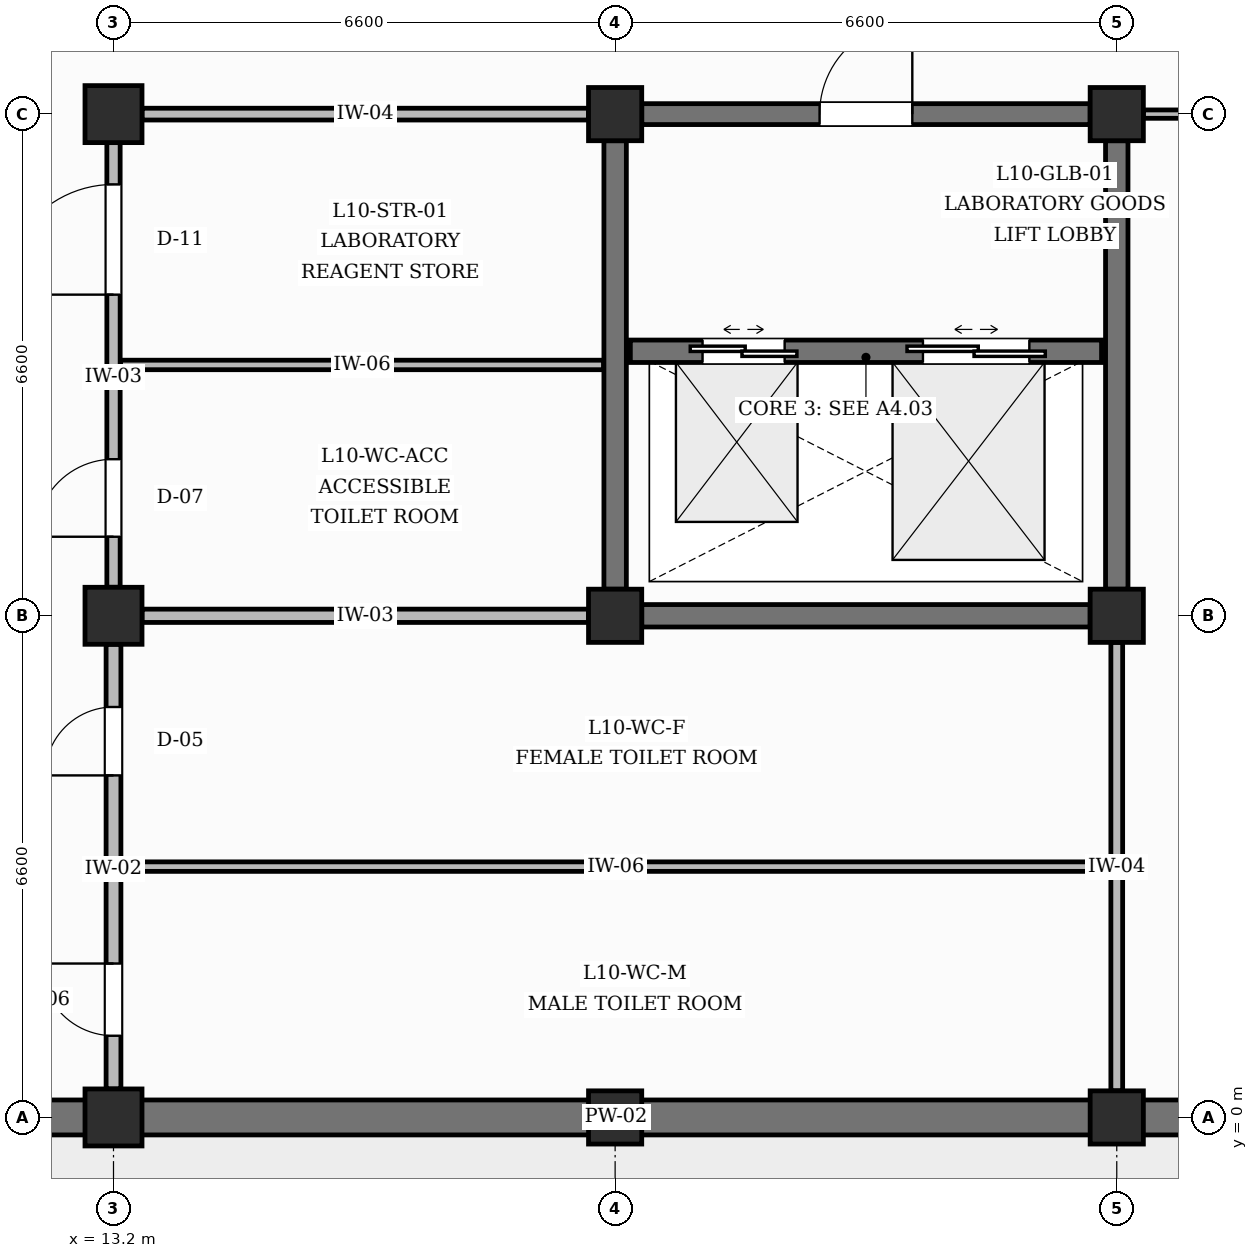
"""IFC4 building model, lengths in metres.
Left out: names, types, materials, properties, quantities, classifications, styles, units other than length and angle.
Written with IfcOpenShell. Run it as: python <this file> out.ifc"""

import sys

from ifc_helpers import new_model, si_unit, direction, frame, frame_2d, origin, origin_2d, place, context, subcontext, project, spatial, rectangle, extrude, element, fill, save


model = new_model("IFC4")
c1 = context("Model", 3, precision=1e-05, world=origin(), true_north=direction((0.0, 1.0)))
c2 = subcontext(c1, "Body", "Model", "MODEL_VIEW")
j1 = project(units=[si_unit("LENGTHUNIT", "METRE"), si_unit("PLANEANGLEUNIT", "RADIAN")], contexts=[c1])
p1 = place(None, origin())
s1 = spatial("IfcSite", under=j1, at=p1, CompositionType="ELEMENT")
p2 = place(p1, origin())
s2 = spatial("IfcBuilding", under=s1, at=p2, CompositionType="ELEMENT")
p3 = place(p2, frame((0.0, 0.0, 43.8)))
s3 = spatial("IfcBuildingStorey", under=s2, at=p3, CompositionType="ELEMENT", Elevation=43.8)
for number, where, z_axis, x_axis in (
    (1, (13.2, 0.0, 0.0), (0.0, 0.0, 1.0), (1.0, 0.0, 0.0)),
    (2, (13.2, 6.6, 0.0), (0.0, 0.0, 1.0), (1.0, 0.0, 0.0)),
    (3, (13.2, 13.2, 0.0), (0.0, 0.0, 1.0), (1.0, 0.0, 0.0)),
):
    element("IfcColumn", number, at=place(p3, frame(where, z_axis=z_axis, x_axis=x_axis)), inside=s3, PredefinedType="COLUMN", context=c2, shape_type="SweptSolid", body=[
        extrude(rectangle(XDim=0.75, YDim=0.75, at=origin_2d()), origin(), (0.0, 0.0, 1.0), 4.2),
    ])
for number, where, z_axis, x_axis in (
    (4, (19.8, 0.0, 0.0), (0.0, 0.0, 1.0), (1.0, 0.0, 0.0)),
    (5, (19.8, 6.6, 0.0), (0.0, 0.0, 1.0), (1.0, 0.0, 0.0)),
    (6, (19.8, 13.2, 0.0), (0.0, 0.0, 1.0), (1.0, 0.0, 0.0)),
    (7, (26.4, 0.0, 0.0), (0.0, 0.0, 1.0), (1.0, 0.0, 0.0)),
    (8, (26.4, 6.6, 0.0), (0.0, 0.0, 1.0), (1.0, 0.0, 0.0)),
    (9, (26.4, 13.2, 0.0), (0.0, 0.0, 1.0), (1.0, 0.0, 0.0)),
):
    element("IfcColumn", number, at=place(p3, frame(where, z_axis=z_axis, x_axis=x_axis)), inside=s3, PredefinedType="COLUMN", context=c2, shape_type="SweptSolid", body=[
        extrude(rectangle(XDim=0.7, YDim=0.7, at=origin_2d()), origin(), (0.0, 0.0, 1.0), 4.2),
    ])
p4 = place(p3, frame((6.975, 0.0, 0.0), z_axis=(0.0, 0.0, 1.0), x_axis=(1.0, 0.0, 0.0)))
e10 = element("IfcWall", 10, at=p4, inside=s3, PredefinedType="SOLIDWALL", context=c2, shape_type="SweptSolid", body=[
    extrude(rectangle(XDim=5.85, YDim=0.46, at=frame_2d((2.925, 0.0))), origin(), (0.0, 0.0, 1.0), 3.29),
])
p5 = place(p3, frame((13.575, 0.0, 0.0), z_axis=(0.0, 0.0, 1.0), x_axis=(1.0, 0.0, 0.0)))
e11 = element("IfcWall", 11, at=p5, inside=s3, PredefinedType="SOLIDWALL", context=c2, shape_type="SweptSolid", body=[
    extrude(rectangle(XDim=5.875, YDim=0.46, at=frame_2d((2.938, 0.0))), origin(), (0.0, 0.0, 1.0), 3.29),
])
p6 = place(p3, frame((20.15, 0.0, 0.0), z_axis=(0.0, 0.0, 1.0), x_axis=(1.0, 0.0, 0.0)))
e12 = element("IfcWall", 12, at=p6, inside=s3, PredefinedType="SOLIDWALL", context=c2, shape_type="SweptSolid", body=[
    extrude(rectangle(XDim=5.9, YDim=0.46, at=frame_2d((2.95, 0.0))), origin(), (0.0, 0.0, 1.0), 3.29),
])
p7 = place(p3, frame((26.75, 0.0, 0.0), z_axis=(0.0, 0.0, 1.0), x_axis=(1.0, 0.0, 0.0)))
e13 = element("IfcWall", 13, at=p7, inside=s3, PredefinedType="SOLIDWALL", context=c2, shape_type="SweptSolid", body=[
    extrude(rectangle(XDim=5.9, YDim=0.46, at=frame_2d((2.95, 0.0))), origin(), (0.0, 0.0, 1.0), 3.29),
])
for number, where, z_axis, x_axis in (
    (14, (20.15, 6.6, 0.0), (0.0, 0.0, 1.0), (1.0, 0.0, 0.0)),
    (15, (19.8, 6.95, 0.0), (0.0, 0.0, 1.0), (0.0, 1.0, 0.0)),
    (16, (26.4, 6.95, 0.0), (0.0, 0.0, 1.0), (0.0, 1.0, 0.0)),
):
    element("IfcWall", number, at=place(p3, frame(where, z_axis=z_axis, x_axis=x_axis)), inside=s3, PredefinedType="SHEAR", context=c2, shape_type="SweptSolid", body=[
        extrude(rectangle(XDim=5.9, YDim=0.295, at=frame_2d((2.95, 0.0))), origin(), (0.0, 0.0, 1.0), 3.29),
    ])
p8 = place(p3, frame((20.15, 13.2, 0.0), z_axis=(0.0, 0.0, 1.0), x_axis=(1.0, 0.0, 0.0)))
e17 = element("IfcWall", 17, at=p8, inside=s3, PredefinedType="SHEAR", context=c2, shape_type="SweptSolid", body=[
    extrude(rectangle(XDim=5.9, YDim=0.275, at=frame_2d((2.95, 0.0))), origin(), (0.0, 0.0, 1.0), 3.29),
])
p9 = place(p8, frame((2.34, 0.0, 0.0)))
e18 = element("IfcOpeningElement", 18, at=p9, cuts=e17, PredefinedType="OPENING", context=c2, shape_type="SweptSolid", body=[
    extrude(rectangle(XDim=1.22, YDim=2.15, at=frame_2d((0.61, 1.075))), frame((0.0, 0.147, 0.0), z_axis=(0.0, -1.0, 0.0), x_axis=(1.0, 0.0, 0.0)), (0.0, 0.0, 1.0), 0.295),
])
p10 = place(p3, frame((20.0, 10.08, 0.0), z_axis=(0.0, 0.0, 1.0), x_axis=(1.0, 0.0, 0.0)))
e19 = element("IfcWall", 19, at=p10, inside=s3, PredefinedType="SHEAR", context=c2, shape_type="SweptSolid", body=[
    extrude(rectangle(XDim=6.2, YDim=0.295, at=frame_2d((3.1, 0.0))), origin(), (0.0, 0.0, 1.0), 3.89),
])
p11 = place(p10, frame((0.95, 0.0, 0.0)))
e20 = element("IfcOpeningElement", 20, at=p11, cuts=e19, PredefinedType="OPENING", context=c2, shape_type="SweptSolid", body=[
    extrude(rectangle(XDim=1.08, YDim=2.15, at=frame_2d((0.54, 1.075))), frame((0.0, 0.157, 0.0), z_axis=(0.0, -1.0, 0.0), x_axis=(1.0, 0.0, 0.0)), (0.0, 0.0, 1.0), 0.315),
])
p12 = place(p10, frame((3.85, 0.0, 0.0)))
e21 = element("IfcOpeningElement", 21, at=p12, cuts=e19, PredefinedType="OPENING", context=c2, shape_type="SweptSolid", body=[
    extrude(rectangle(XDim=1.4, YDim=2.35, at=frame_2d((0.7, 1.175))), frame((0.0, 0.157, 0.0), z_axis=(0.0, -1.0, 0.0), x_axis=(1.0, 0.0, 0.0)), (0.0, 0.0, 1.0), 0.315),
])
p13 = place(p3, frame((13.2, 0.375, 0.0), z_axis=(0.0, 0.0, 1.0), x_axis=(0.0, 1.0, 0.0)))
e22 = element("IfcWall", 22, at=p13, inside=s3, PredefinedType="PARTITIONING", context=c2, shape_type="SweptSolid", body=[
    extrude(rectangle(XDim=5.85, YDim=0.195, at=frame_2d((2.925, 0.0))), origin(), (0.0, 0.0, 1.0), 3.29),
])
p14 = place(p13, frame((0.7, 0.0, 0.0)))
e23 = element("IfcOpeningElement", 23, at=p14, cuts=e22, PredefinedType="OPENING", context=c2, shape_type="SweptSolid", body=[
    extrude(rectangle(XDim=0.95, YDim=2.1, at=frame_2d((0.475, 1.05))), frame((0.0, 0.107, 0.0), z_axis=(0.0, -1.0, 0.0), x_axis=(1.0, 0.0, 0.0)), (0.0, 0.0, 1.0), 0.215),
])
p15 = place(p13, frame((4.125, 0.0, 0.0)))
e24 = element("IfcOpeningElement", 24, at=p15, cuts=e22, PredefinedType="OPENING", context=c2, shape_type="SweptSolid", body=[
    extrude(rectangle(XDim=0.9, YDim=2.1, at=frame_2d((0.45, 1.05))), frame((0.0, 0.107, 0.0), z_axis=(0.0, -1.0, 0.0), x_axis=(1.0, 0.0, 0.0)), (0.0, 0.0, 1.0), 0.215),
])
p16 = place(p3, frame((26.4, 0.35, 0.0), z_axis=(0.0, 0.0, 1.0), x_axis=(0.0, 1.0, 0.0)))
e25 = element("IfcWall", 25, at=p16, inside=s3, PredefinedType="PARTITIONING", context=c2, shape_type="SweptSolid", body=[
    extrude(rectangle(XDim=5.9, YDim=0.155, at=frame_2d((2.95, 0.0))), origin(), (0.0, 0.0, 1.0), 3.29),
])
p17 = place(p3, frame((13.575, 6.6, 0.0), z_axis=(0.0, 0.0, 1.0), x_axis=(1.0, 0.0, 0.0)))
e26 = element("IfcWall", 26, at=p17, inside=s3, PredefinedType="PARTITIONING", context=c2, shape_type="SweptSolid", body=[
    extrude(rectangle(XDim=5.875, YDim=0.175, at=frame_2d((2.938, 0.0))), origin(), (0.0, 0.0, 1.0), 3.29),
])
p18 = place(p3, frame((13.2, 6.975, 0.0), z_axis=(0.0, 0.0, 1.0), x_axis=(0.0, 1.0, 0.0)))
e27 = element("IfcWall", 27, at=p18, inside=s3, PredefinedType="PARTITIONING", context=c2, shape_type="SweptSolid", body=[
    extrude(rectangle(XDim=5.85, YDim=0.175, at=frame_2d((2.925, 0.0))), origin(), (0.0, 0.0, 1.0), 3.29),
])
p19 = place(p18, frame((0.665, 0.0, 0.0)))
e28 = element("IfcOpeningElement", 28, at=p19, cuts=e27, PredefinedType="OPENING", context=c2, shape_type="SweptSolid", body=[
    extrude(rectangle(XDim=1.02, YDim=2.15, at=frame_2d((0.51, 1.075))), frame((0.0, 0.097, 0.0), z_axis=(0.0, -1.0, 0.0), x_axis=(1.0, 0.0, 0.0)), (0.0, 0.0, 1.0), 0.195),
])
p20 = place(p18, frame((3.85, 0.0, 0.0)))
e29 = element("IfcOpeningElement", 29, at=p20, cuts=e27, PredefinedType="OPENING", context=c2, shape_type="SweptSolid", body=[
    extrude(rectangle(XDim=1.45, YDim=2.25, at=frame_2d((0.725, 1.125))), frame((0.0, 0.097, 0.0), z_axis=(0.0, -1.0, 0.0), x_axis=(1.0, 0.0, 0.0)), (0.0, 0.0, 1.0), 0.195),
])
p21 = place(p3, frame((13.575, 13.2, 0.0), z_axis=(0.0, 0.0, 1.0), x_axis=(1.0, 0.0, 0.0)))
e30 = element("IfcWall", 30, at=p21, inside=s3, PredefinedType="PARTITIONING", context=c2, shape_type="SweptSolid", body=[
    extrude(rectangle(XDim=5.875, YDim=0.155, at=frame_2d((2.938, 0.0))), origin(), (0.0, 0.0, 1.0), 3.29),
])
p22 = place(p3, frame((26.75, 13.2, 0.0), z_axis=(0.0, 0.0, 1.0), x_axis=(1.0, 0.0, 0.0)))
e31 = element("IfcWall", 31, at=p22, inside=s3, PredefinedType="PARTITIONING", context=c2, shape_type="SweptSolid", body=[
    extrude(rectangle(XDim=5.9, YDim=0.11, at=frame_2d((2.95, 0.0))), origin(), (0.0, 0.0, 1.0), 3.29),
])
p23 = place(p22, frame((2.25, 0.0, 0.0)))
e32 = element("IfcOpeningElement", 32, at=p23, cuts=e31, PredefinedType="OPENING", context=c2, shape_type="SweptSolid", body=[
    extrude(rectangle(XDim=1.4, YDim=2.25, at=frame_2d((0.7, 1.125))), frame((0.0, 0.065, 0.0), z_axis=(0.0, -1.0, 0.0), x_axis=(1.0, 0.0, 0.0)), (0.0, 0.0, 1.0), 0.13),
])
p24 = place(p3, frame((13.302, 3.3, 0.0), z_axis=(0.0, 0.0, 1.0), x_axis=(1.0, 0.0, 0.0)))
e33 = element("IfcWall", 33, at=p24, inside=s3, PredefinedType="PARTITIONING", context=c2, shape_type="SweptSolid", body=[
    extrude(rectangle(XDim=13.015, YDim=0.125, at=frame_2d((6.507, 0.0))), origin(), (0.0, 0.0, 1.0), 3.89),
])
p25 = place(p3, frame((13.292, 9.9, 0.0), z_axis=(0.0, 0.0, 1.0), x_axis=(1.0, 0.0, 0.0)))
e34 = element("IfcWall", 34, at=p25, inside=s3, PredefinedType="PARTITIONING", context=c2, shape_type="SweptSolid", body=[
    extrude(rectangle(XDim=6.355, YDim=0.125, at=frame_2d((3.177, 0.0))), origin(), (0.0, 0.0, 1.0), 3.89),
])
p26 = place(p11, origin())
e35 = element("IfcDoor", 35, at=p26, inside=s3, OperationType="DOUBLE_DOOR_SLIDING", PredefinedType="USERDEFINED", context=c2, shape_type="SweptSolid", body=[
    extrude(rectangle(XDim=1.08, YDim=2.15, at=frame_2d((0.54, 1.075))), frame((0.0, 0.025, 0.0), z_axis=(0.0, -1.0, 0.0), x_axis=(1.0, 0.0, 0.0)), (0.0, 0.0, 1.0), 0.05),
])
fill(e20, e35)
p27 = place(p12, origin())
e36 = element("IfcDoor", 36, at=p27, inside=s3, OperationType="DOUBLE_DOOR_SLIDING", PredefinedType="USERDEFINED", context=c2, shape_type="SweptSolid", body=[
    extrude(rectangle(XDim=1.4, YDim=2.35, at=frame_2d((0.7, 1.175))), frame((0.0, 0.025, 0.0), z_axis=(0.0, -1.0, 0.0), x_axis=(1.0, 0.0, 0.0)), (0.0, 0.0, 1.0), 0.05),
])
fill(e21, e36)
p28 = place(p9, origin())
e37 = element("IfcDoor", 37, at=p28, inside=s3, OperationType="SINGLE_SWING_RIGHT", PredefinedType="DOOR", context=c2, shape_type="SweptSolid", body=[
    extrude(rectangle(XDim=1.22, YDim=2.15, at=frame_2d((0.61, 1.075))), frame((0.0, 0.025, 0.0), z_axis=(0.0, -1.0, 0.0), x_axis=(1.0, 0.0, 0.0)), (0.0, 0.0, 1.0), 0.05),
])
fill(e18, e37)
p29 = place(p14, origin())
e38 = element("IfcDoor", 38, at=p29, inside=s3, OperationType="SINGLE_SWING_RIGHT", PredefinedType="DOOR", context=c2, shape_type="SweptSolid", body=[
    extrude(rectangle(XDim=0.95, YDim=2.1, at=frame_2d((0.475, 1.05))), frame((0.0, 0.025, 0.0), z_axis=(0.0, -1.0, 0.0), x_axis=(1.0, 0.0, 0.0)), (0.0, 0.0, 1.0), 0.05),
])
fill(e23, e38)
p30 = place(p15, origin())
e39 = element("IfcDoor", 39, at=p30, inside=s3, OperationType="SINGLE_SWING_LEFT", PredefinedType="DOOR", context=c2, shape_type="SweptSolid", body=[
    extrude(rectangle(XDim=0.9, YDim=2.1, at=frame_2d((0.45, 1.05))), frame((0.0, 0.025, 0.0), z_axis=(0.0, -1.0, 0.0), x_axis=(1.0, 0.0, 0.0)), (0.0, 0.0, 1.0), 0.05),
])
fill(e24, e39)
p31 = place(p19, origin())
e40 = element("IfcDoor", 40, at=p31, inside=s3, OperationType="SINGLE_SWING_LEFT", PredefinedType="DOOR", context=c2, shape_type="SweptSolid", body=[
    extrude(rectangle(XDim=1.02, YDim=2.15, at=frame_2d((0.51, 1.075))), frame((0.0, 0.025, 0.0), z_axis=(0.0, -1.0, 0.0), x_axis=(1.0, 0.0, 0.0)), (0.0, 0.0, 1.0), 0.05),
])
fill(e28, e40)
p32 = place(p20, origin())
e41 = element("IfcDoor", 41, at=p32, inside=s3, OperationType="SINGLE_SWING_LEFT", PredefinedType="DOOR", context=c2, shape_type="SweptSolid", body=[
    extrude(rectangle(XDim=1.45, YDim=2.25, at=frame_2d((0.725, 1.125))), frame((0.0, 0.025, 0.0), z_axis=(0.0, -1.0, 0.0), x_axis=(1.0, 0.0, 0.0)), (0.0, 0.0, 1.0), 0.05),
])
fill(e29, e41)
save(model, sys.argv[1])
